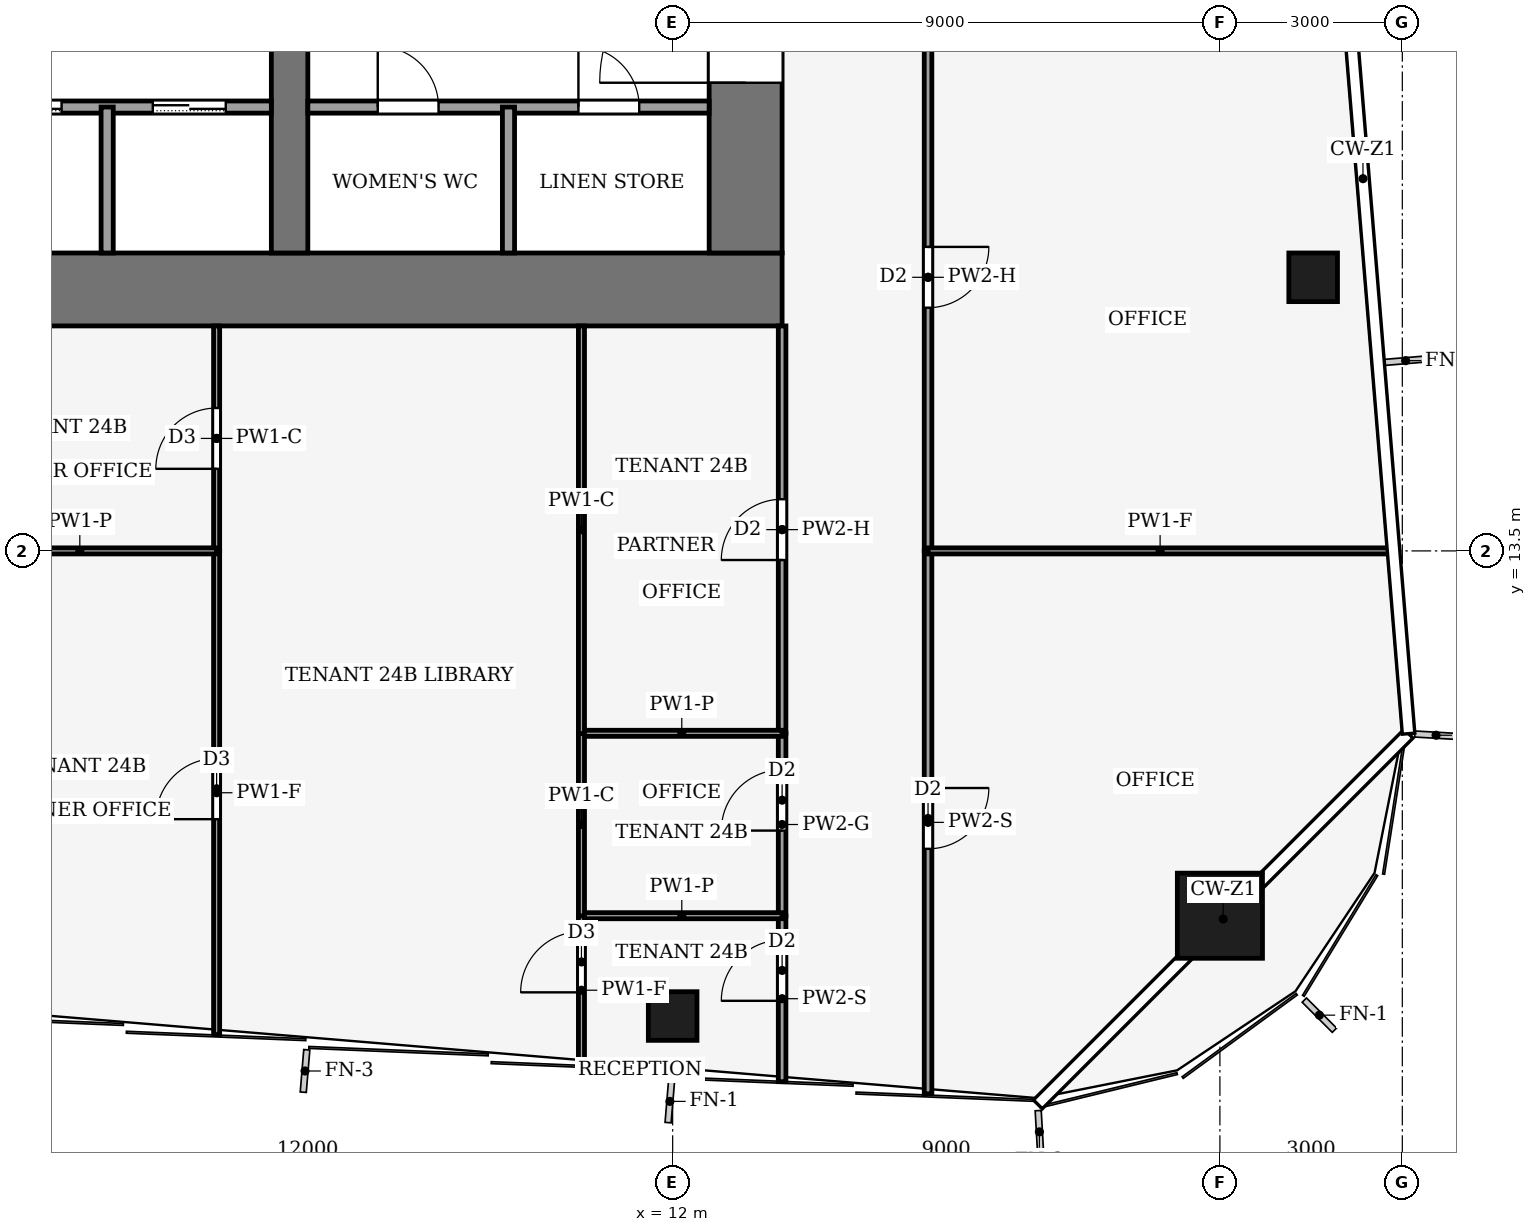
"""IFC4 building model, lengths in metres.
Left out: names, types, materials, properties, quantities, classifications, styles, units other than length and angle.
Written with IfcOpenShell. Run it as: python <this file> out.ifc"""

import sys

from ifc_helpers import new_model, si_unit, direction, frame, frame_2d, origin, origin_2d, place, context, subcontext, project, spatial, rectangle, hollow_rectangle, extrude, element, fill, save


model = new_model("IFC4")
c1 = context("Model", 3, precision=1e-05, world=origin(), true_north=direction((0.0, 1.0)))
c2 = subcontext(c1, "Body", "Model", "MODEL_VIEW")
j1 = project(units=[si_unit("LENGTHUNIT", "METRE"), si_unit("PLANEANGLEUNIT", "RADIAN")], contexts=[c1])
p1 = place(None, origin())
s1 = spatial("IfcSite", under=j1, at=p1, CompositionType="ELEMENT")
p2 = place(p1, origin())
s2 = spatial("IfcBuilding", under=s1, at=p2, CompositionType="ELEMENT")
p3 = place(p2, frame((0.0, 0.0, 106.0)))
s3 = spatial("IfcBuildingStorey", under=s2, at=p3, CompositionType="ELEMENT", Elevation=106.0)
p4 = place(p3, frame((-13.8, 17.8, -0.13), z_axis=(0.0, 0.0, 1.0), x_axis=(1.0, 0.0, 0.0)))
e1 = element("IfcWall", 1, at=p4, inside=s3, PredefinedType="SHEAR", context=c2, shape_type="SweptSolid", body=[
    extrude(rectangle(XDim=27.6, YDim=1.2, at=frame_2d((13.8, 0.0))), origin(), (0.0, 0.0, 1.0), 4.0),
])
p5 = place(p3, frame((13.2, 18.4, -0.13), z_axis=(0.0, 0.0, 1.0), x_axis=(0.0, 1.0, 0.0)))
e2 = element("IfcWall", 2, at=p5, inside=s3, PredefinedType="SHEAR", context=c2, shape_type="SweptSolid", body=[
    extrude(rectangle(XDim=19.2, YDim=1.2, at=frame_2d((9.6, 0.0))), origin(), (0.0, 0.0, 1.0), 4.0),
])
p6 = place(p5, frame((2.8, 0.0, 0.13)))
e3 = element("IfcOpeningElement", 3, at=p6, cuts=e2, PredefinedType="OPENING", context=c2, shape_type="SweptSolid", body=[
    extrude(rectangle(XDim=2.4, YDim=2.4, at=frame_2d((1.2, 1.2))), frame((0.0, 0.61, 0.0), z_axis=(0.0, -1.0, 0.0), x_axis=(1.0, 0.0, 0.0)), (0.0, 0.0, 1.0), 1.22),
])
p7 = place(p5, frame((13.3, 0.0, 0.13)))
e4 = element("IfcOpeningElement", 4, at=p7, cuts=e2, PredefinedType="OPENING", context=c2, shape_type="SweptSolid", body=[
    extrude(rectangle(XDim=2.4, YDim=2.4, at=frame_2d((1.2, 1.2))), frame((0.0, 0.61, 0.0), z_axis=(0.0, -1.0, 0.0), x_axis=(1.0, 0.0, 0.0)), (0.0, 0.0, 1.0), 1.22),
])
p8 = place(p3, frame((5.7, 18.4, -0.13), z_axis=(0.0, 0.0, 1.0), x_axis=(0.0, 1.0, 0.0)))
e5 = element("IfcWall", 5, at=p8, inside=s3, PredefinedType="SHEAR", context=c2, shape_type="SweptSolid", body=[
    extrude(rectangle(XDim=19.2, YDim=0.6, at=frame_2d((9.6, 0.0))), origin(), (0.0, 0.0, 1.0), 4.0),
])
p9 = place(p8, frame((8.35, 0.0, 0.13)))
e6 = element("IfcOpeningElement", 6, at=p9, cuts=e5, PredefinedType="OPENING", context=c2, shape_type="SweptSolid", body=[
    extrude(rectangle(XDim=0.9, YDim=2.1, at=frame_2d((0.45, 1.05))), frame((0.0, 0.31, 0.0), z_axis=(0.0, -1.0, 0.0), x_axis=(1.0, 0.0, 0.0)), (0.0, 0.0, 1.0), 0.62),
])
p10 = place(p8, frame((13.3, 0.0, 0.13)))
e7 = element("IfcOpeningElement", 7, at=p10, cuts=e5, PredefinedType="OPENING", context=c2, shape_type="SweptSolid", body=[
    extrude(rectangle(XDim=2.4, YDim=2.4, at=frame_2d((1.2, 1.2))), frame((0.0, 0.31, 0.0), z_axis=(0.0, -1.0, 0.0), x_axis=(1.0, 0.0, 0.0)), (0.0, 0.0, 1.0), 0.62),
])
p11 = place(p3, frame((21.0, 7.5, 0.0), z_axis=(0.0, 0.0, 1.0), x_axis=(1.0, 0.0, 0.0)))
e8 = element("IfcColumn", 8, at=p11, inside=s3, PredefinedType="COLUMN", context=c2, shape_type="SweptSolid", body=[
    extrude(hollow_rectangle(XDim=1.4, YDim=1.4, WallThickness=0.08, at=origin_2d()), origin(), (0.0, 0.0, 1.0), 4.0),
])
for number, where, z_axis, x_axis in (
    (9, (12.0, 5.85, 0.0), (0.0, 0.0, 1.0), (1.0, 0.0, 0.0)),
    (10, (22.534, 18.0, 0.0), (0.0, 0.0, 1.0), (1.0, 0.0, 0.0)),
):
    element("IfcColumn", number, at=place(p3, frame(where, z_axis=z_axis, x_axis=x_axis)), inside=s3, PredefinedType="COLUMN", context=c2, shape_type="SweptSolid", body=[
        extrude(hollow_rectangle(XDim=0.8, YDim=0.8, WallThickness=0.04, at=origin_2d()), origin(), (0.0, 0.0, 1.0), 4.0),
    ])
p12 = place(p3, frame((-5.4, 20.8, 0.0), z_axis=(0.0, 0.0, 1.0), x_axis=(1.0, 0.0, 0.0)))
e11 = element("IfcWall", 11, at=p12, inside=s3, PredefinedType="PARTITIONING", context=c2, shape_type="SweptSolid", body=[
    extrude(rectangle(XDim=10.8, YDim=0.2, at=frame_2d((5.4, 0.0))), origin(), (0.0, 0.0, 1.0), 3.87),
])
p13 = place(p12, frame((0.75, 0.0, 0.0)))
e12 = element("IfcOpeningElement", 12, at=p13, cuts=e11, PredefinedType="OPENING", context=c2, shape_type="SweptSolid", body=[
    extrude(rectangle(XDim=1.2, YDim=2.2, at=frame_2d((0.6, 1.1))), frame((0.0, 0.11, 0.0), z_axis=(0.0, -1.0, 0.0), x_axis=(1.0, 0.0, 0.0)), (0.0, 0.0, 1.0), 0.22),
])
p14 = place(p12, frame((3.45, 0.0, 0.0)))
e13 = element("IfcOpeningElement", 13, at=p14, cuts=e11, PredefinedType="OPENING", context=c2, shape_type="SweptSolid", body=[
    extrude(rectangle(XDim=1.2, YDim=2.2, at=frame_2d((0.6, 1.1))), frame((0.0, 0.11, 0.0), z_axis=(0.0, -1.0, 0.0), x_axis=(1.0, 0.0, 0.0)), (0.0, 0.0, 1.0), 0.22),
])
p15 = place(p12, frame((6.15, 0.0, 0.0)))
e14 = element("IfcOpeningElement", 14, at=p15, cuts=e11, PredefinedType="OPENING", context=c2, shape_type="SweptSolid", body=[
    extrude(rectangle(XDim=1.2, YDim=2.2, at=frame_2d((0.6, 1.1))), frame((0.0, 0.11, 0.0), z_axis=(0.0, -1.0, 0.0), x_axis=(1.0, 0.0, 0.0)), (0.0, 0.0, 1.0), 0.22),
])
p16 = place(p12, frame((8.85, 0.0, 0.0)))
e15 = element("IfcOpeningElement", 15, at=p16, cuts=e11, PredefinedType="OPENING", context=c2, shape_type="SweptSolid", body=[
    extrude(rectangle(XDim=1.2, YDim=2.2, at=frame_2d((0.6, 1.1))), frame((0.0, 0.11, 0.0), z_axis=(0.0, -1.0, 0.0), x_axis=(1.0, 0.0, 0.0)), (0.0, 0.0, 1.0), 0.22),
])
p17 = place(p3, frame((6.0, 20.8, 0.0), z_axis=(0.0, 0.0, 1.0), x_axis=(1.0, 0.0, 0.0)))
e16 = element("IfcWall", 16, at=p17, inside=s3, PredefinedType="PARTITIONING", context=c2, shape_type="SweptSolid", body=[
    extrude(rectangle(XDim=6.6, YDim=0.2, at=frame_2d((3.3, 0.0))), origin(), (0.0, 0.0, 1.0), 3.87),
])
p18 = place(p17, frame((1.15, 0.0, 0.0)))
e17 = element("IfcOpeningElement", 17, at=p18, cuts=e16, PredefinedType="OPENING", context=c2, shape_type="SweptSolid", body=[
    extrude(rectangle(XDim=1.0, YDim=2.1, at=frame_2d((0.5, 1.05))), frame((0.0, 0.11, 0.0), z_axis=(0.0, -1.0, 0.0), x_axis=(1.0, 0.0, 0.0)), (0.0, 0.0, 1.0), 0.22),
])
p19 = place(p17, frame((4.45, 0.0, 0.0)))
e18 = element("IfcOpeningElement", 18, at=p19, cuts=e16, PredefinedType="OPENING", context=c2, shape_type="SweptSolid", body=[
    extrude(rectangle(XDim=1.0, YDim=2.1, at=frame_2d((0.5, 1.05))), frame((0.0, 0.11, 0.0), z_axis=(0.0, -1.0, 0.0), x_axis=(1.0, 0.0, 0.0)), (0.0, 0.0, 1.0), 0.22),
])
for number, where, z_axis, x_axis in (
    (19, (2.7, 18.4, 0.0), (0.0, 0.0, 1.0), (0.0, 1.0, 0.0)),
    (20, (9.3, 18.4, 0.0), (0.0, 0.0, 1.0), (0.0, 1.0, 0.0)),
):
    element("IfcWall", number, at=place(p3, frame(where, z_axis=z_axis, x_axis=x_axis)), inside=s3, PredefinedType="PARTITIONING", context=c2, shape_type="SweptSolid", body=[
        extrude(rectangle(XDim=2.4, YDim=0.2, at=frame_2d((1.2, 0.0))), origin(), (0.0, 0.0, 1.0), 3.87),
    ])
p20 = place(p3, frame((16.2, 13.5, 0.0), z_axis=(0.0, 0.0, 1.0), x_axis=(0.0, -1.0, 0.0)))
e21 = element("IfcWall", 21, at=p20, inside=s3, PredefinedType="PARTITIONING", context=c2, shape_type="SweptSolid", body=[
    extrude(rectangle(XDim=8.93, YDim=0.125, at=frame_2d((4.465, 0.0))), origin(), (0.0, 0.0, 1.0), 3.04),
])
p21 = place(p20, frame((3.9, 0.0, 0.0)))
e22 = element("IfcOpeningElement", 22, at=p21, cuts=e21, PredefinedType="OPENING", context=c2, shape_type="SweptSolid", body=[
    extrude(rectangle(XDim=1.0, YDim=2.1, at=frame_2d((0.5, 1.05))), frame((0.0, 0.073, 0.0), z_axis=(0.0, -1.0, 0.0), x_axis=(1.0, 0.0, 0.0)), (0.0, 0.0, 1.0), 0.145),
])
p22 = place(p3, frame((16.2, 22.5, 0.0), z_axis=(0.0, 0.0, 1.0), x_axis=(0.0, -1.0, 0.0)))
e23 = element("IfcWall", 23, at=p22, inside=s3, PredefinedType="PARTITIONING", context=c2, shape_type="SweptSolid", body=[
    extrude(rectangle(XDim=9.0, YDim=0.125, at=frame_2d((4.5, 0.0))), origin(), (0.0, 0.0, 1.0), 3.14),
])
p23 = place(p22, frame((4.0, 0.0, 0.0)))
e24 = element("IfcOpeningElement", 24, at=p23, cuts=e23, PredefinedType="OPENING", context=c2, shape_type="SweptSolid", body=[
    extrude(rectangle(XDim=1.0, YDim=2.1, at=frame_2d((0.5, 1.05))), frame((0.0, 0.073, 0.0), z_axis=(0.0, -1.0, 0.0), x_axis=(1.0, 0.0, 0.0)), (0.0, 0.0, 1.0), 0.145),
])
p24 = place(p3, frame((13.8, 4.77, 0.0), z_axis=(0.0, 0.0, 1.0), x_axis=(0.0, 1.0, 0.0)))
e25 = element("IfcWall", 25, at=p24, inside=s3, PredefinedType="PARTITIONING", context=c2, shape_type="SweptSolid", body=[
    extrude(rectangle(XDim=2.73, YDim=0.125, at=frame_2d((1.365, 0.0))), origin(), (0.0, 0.0, 1.0), 3.04),
])
p25 = place(p24, frame((1.33, 0.0, 0.0)))
e26 = element("IfcOpeningElement", 26, at=p25, cuts=e25, PredefinedType="OPENING", context=c2, shape_type="SweptSolid", body=[
    extrude(rectangle(XDim=1.0, YDim=2.1, at=frame_2d((0.5, 1.05))), frame((0.0, 0.073, 0.0), z_axis=(0.0, -1.0, 0.0), x_axis=(1.0, 0.0, 0.0)), (0.0, 0.0, 1.0), 0.145),
])
p26 = place(p3, frame((13.8, 7.5, 0.0), z_axis=(0.0, 0.0, 1.0), x_axis=(0.0, 1.0, 0.0)))
e27 = element("IfcWall", 27, at=p26, inside=s3, PredefinedType="PARTITIONING", context=c2, shape_type="SweptSolid", body=[
    extrude(rectangle(XDim=3.0, YDim=0.125, at=frame_2d((1.5, 0.0))), origin(), (0.0, 0.0, 1.0), 3.87),
])
p27 = place(p26, frame((1.4, 0.0, 0.0)))
e28 = element("IfcOpeningElement", 28, at=p27, cuts=e27, PredefinedType="OPENING", context=c2, shape_type="SweptSolid", body=[
    extrude(rectangle(XDim=1.0, YDim=2.1, at=frame_2d((0.5, 1.05))), frame((0.0, 0.073, 0.0), z_axis=(0.0, -1.0, 0.0), x_axis=(1.0, 0.0, 0.0)), (0.0, 0.0, 1.0), 0.145),
])
p28 = place(p3, frame((13.8, 10.5, 0.0), z_axis=(0.0, 0.0, 1.0), x_axis=(0.0, 1.0, 0.0)))
e29 = element("IfcWall", 29, at=p28, inside=s3, PredefinedType="PARTITIONING", context=c2, shape_type="SweptSolid", body=[
    extrude(rectangle(XDim=6.7, YDim=0.125, at=frame_2d((3.35, 0.0))), origin(), (0.0, 0.0, 1.0), 3.14),
])
p29 = place(p28, frame((2.85, 0.0, 0.0)))
e30 = element("IfcOpeningElement", 30, at=p29, cuts=e29, PredefinedType="OPENING", context=c2, shape_type="SweptSolid", body=[
    extrude(rectangle(XDim=1.0, YDim=2.1, at=frame_2d((0.5, 1.05))), frame((0.0, 0.073, 0.0), z_axis=(0.0, -1.0, 0.0), x_axis=(1.0, 0.0, 0.0)), (0.0, 0.0, 1.0), 0.145),
])
p30 = place(p3, frame((23.833, 13.5, 0.0), z_axis=(0.0, 0.0, 1.0), x_axis=(-1.0, 0.0, 0.0)))
e31 = element("IfcWall", 31, at=p30, inside=s3, PredefinedType="PARTITIONING", context=c2, shape_type="SweptSolid", body=[
    extrude(rectangle(XDim=7.634, YDim=0.1, at=frame_2d((3.817, 0.0))), origin(), (0.0, 0.0, 1.0), 3.04),
])
p31 = place(p3, frame((13.8, 7.5, 0.0), z_axis=(0.0, 0.0, 1.0), x_axis=(-1.0, 0.0, 0.0)))
e32 = element("IfcWall", 32, at=p31, inside=s3, PredefinedType="PARTITIONING", context=c2, shape_type="SweptSolid", body=[
    extrude(rectangle(XDim=3.3, YDim=0.1, at=frame_2d((1.65, 0.0))), origin(), (0.0, 0.0, 1.0), 3.44),
])
p32 = place(p3, frame((10.5, 5.045, 0.0), z_axis=(0.0, 0.0, 1.0), x_axis=(0.0, 1.0, 0.0)))
e33 = element("IfcWall", 33, at=p32, inside=s3, PredefinedType="PARTITIONING", context=c2, shape_type="SweptSolid", body=[
    extrude(rectangle(XDim=2.459, YDim=0.1, at=frame_2d((1.229, 0.0))), origin(), (0.0, 0.0, 1.0), 3.04),
])
p33 = place(p32, frame((1.195, 0.0, 0.0)))
e34 = element("IfcOpeningElement", 34, at=p33, cuts=e33, PredefinedType="OPENING", context=c2, shape_type="SweptSolid", body=[
    extrude(rectangle(XDim=1.0, YDim=2.1, at=frame_2d((0.5, 1.05))), frame((0.0, 0.06, 0.0), z_axis=(0.0, -1.0, 0.0), x_axis=(1.0, 0.0, 0.0)), (0.0, 0.0, 1.0), 0.12),
])
p34 = place(p3, frame((13.8, 10.5, 0.0), z_axis=(0.0, 0.0, 1.0), x_axis=(-1.0, 0.0, 0.0)))
e35 = element("IfcWall", 35, at=p34, inside=s3, PredefinedType="PARTITIONING", context=c2, shape_type="SweptSolid", body=[
    extrude(rectangle(XDim=3.3, YDim=0.1, at=frame_2d((1.65, 0.0))), origin(), (0.0, 0.0, 1.0), 3.44),
])
p35 = place(p3, frame((10.5, 10.504, 0.0), z_axis=(0.0, 0.0, 1.0), x_axis=(0.0, -1.0, 0.0)))
e36 = element("IfcWall", 36, at=p35, inside=s3, PredefinedType="PARTITIONING", context=c2, shape_type="SweptSolid", body=[
    extrude(rectangle(XDim=3.008, YDim=0.1, at=frame_2d((1.504, 0.0))), origin(), (0.0, 0.0, 1.0), 3.87),
])
p36 = place(p3, frame((10.5, 17.2, 0.0), z_axis=(0.0, 0.0, 1.0), x_axis=(0.0, -1.0, 0.0)))
e37 = element("IfcWall", 37, at=p36, inside=s3, PredefinedType="PARTITIONING", context=c2, shape_type="SweptSolid", body=[
    extrude(rectangle(XDim=6.704, YDim=0.1, at=frame_2d((3.352, 0.0))), origin(), (0.0, 0.0, 1.0), 3.87),
])
p37 = place(p3, frame((4.5, 5.545, 0.0), z_axis=(0.0, 0.0, 1.0), x_axis=(0.0, 1.0, 0.0)))
e38 = element("IfcWall", 38, at=p37, inside=s3, PredefinedType="PARTITIONING", context=c2, shape_type="SweptSolid", body=[
    extrude(rectangle(XDim=7.955, YDim=0.1, at=frame_2d((3.978, 0.0))), origin(), (0.0, 0.0, 1.0), 3.04),
])
p38 = place(p37, frame((3.542, 0.0, 0.0)))
e39 = element("IfcOpeningElement", 39, at=p38, cuts=e38, PredefinedType="OPENING", context=c2, shape_type="SweptSolid", body=[
    extrude(rectangle(XDim=1.0, YDim=2.1, at=frame_2d((0.5, 1.05))), frame((0.0, 0.06, 0.0), z_axis=(0.0, -1.0, 0.0), x_axis=(1.0, 0.0, 0.0)), (0.0, 0.0, 1.0), 0.12),
])
p39 = place(p3, frame((4.5, 13.5, 0.0), z_axis=(0.0, 0.0, 1.0), x_axis=(0.0, 1.0, 0.0)))
e40 = element("IfcWall", 40, at=p39, inside=s3, PredefinedType="PARTITIONING", context=c2, shape_type="SweptSolid", body=[
    extrude(rectangle(XDim=3.7, YDim=0.1, at=frame_2d((1.85, 0.0))), origin(), (0.0, 0.0, 1.0), 3.87),
])
p40 = place(p39, frame((1.35, 0.0, 0.0)))
e41 = element("IfcOpeningElement", 41, at=p40, cuts=e40, PredefinedType="OPENING", context=c2, shape_type="SweptSolid", body=[
    extrude(rectangle(XDim=1.0, YDim=2.1, at=frame_2d((0.5, 1.05))), frame((0.0, 0.06, 0.0), z_axis=(0.0, -1.0, 0.0), x_axis=(1.0, 0.0, 0.0)), (0.0, 0.0, 1.0), 0.12),
])
p41 = place(p3, frame((4.5, 13.5, 0.0), z_axis=(0.0, 0.0, 1.0), x_axis=(-1.0, 0.0, 0.0)))
e42 = element("IfcWall", 42, at=p41, inside=s3, PredefinedType="PARTITIONING", context=c2, shape_type="SweptSolid", body=[
    extrude(rectangle(XDim=4.5, YDim=0.1, at=frame_2d((2.25, 0.0))), origin(), (0.0, 0.0, 1.0), 3.44),
])
p42 = place(p15, origin())
e43 = element("IfcDoor", 43, at=p42, inside=s3, OperationType="SLIDING_TO_LEFT", PredefinedType="DOOR", context=c2, shape_type="SweptSolid", body=[
    extrude(rectangle(XDim=1.2, YDim=2.2, at=frame_2d((0.6, 1.1))), frame((0.0, 0.025, 0.0), z_axis=(0.0, -1.0, 0.0), x_axis=(1.0, 0.0, 0.0)), (0.0, 0.0, 1.0), 0.05),
])
fill(e14, e43)
p43 = place(p16, origin())
e44 = element("IfcDoor", 44, at=p43, inside=s3, OperationType="SLIDING_TO_LEFT", PredefinedType="DOOR", context=c2, shape_type="SweptSolid", body=[
    extrude(rectangle(XDim=1.2, YDim=2.2, at=frame_2d((0.6, 1.1))), frame((0.0, 0.025, 0.0), z_axis=(0.0, -1.0, 0.0), x_axis=(1.0, 0.0, 0.0)), (0.0, 0.0, 1.0), 0.05),
])
fill(e15, e44)
p44 = place(p18, origin())
e45 = element("IfcDoor", 45, at=p44, inside=s3, OperationType="SINGLE_SWING_LEFT", PredefinedType="DOOR", context=c2, shape_type="SweptSolid", body=[
    extrude(rectangle(XDim=1.0, YDim=2.1, at=frame_2d((0.5, 1.05))), frame((0.0, 0.025, 0.0), z_axis=(0.0, -1.0, 0.0), x_axis=(1.0, 0.0, 0.0)), (0.0, 0.0, 1.0), 0.05),
])
fill(e17, e45)
p45 = place(p19, origin())
e46 = element("IfcDoor", 46, at=p45, inside=s3, OperationType="SINGLE_SWING_LEFT", PredefinedType="DOOR", context=c2, shape_type="SweptSolid", body=[
    extrude(rectangle(XDim=1.0, YDim=2.1, at=frame_2d((0.5, 1.05))), frame((0.0, 0.025, 0.0), z_axis=(0.0, -1.0, 0.0), x_axis=(1.0, 0.0, 0.0)), (0.0, 0.0, 1.0), 0.05),
])
fill(e18, e46)
p46 = place(p6, origin())
e47 = element("IfcDoor", 47, at=p46, inside=s3, OperationType="DOUBLE_DOOR_SINGLE_SWING", PredefinedType="DOOR", context=c2, shape_type="SweptSolid", body=[
    extrude(rectangle(XDim=2.4, YDim=2.4, at=frame_2d((1.2, 1.2))), frame((0.0, 0.025, 0.0), z_axis=(0.0, -1.0, 0.0), x_axis=(1.0, 0.0, 0.0)), (0.0, 0.0, 1.0), 0.05),
])
fill(e3, e47)
p47 = place(p21, origin())
e48 = element("IfcDoor", 48, at=p47, inside=s3, OperationType="SINGLE_SWING_LEFT", PredefinedType="DOOR", context=c2, shape_type="SweptSolid", body=[
    extrude(rectangle(XDim=1.0, YDim=2.1, at=frame_2d((0.5, 1.05))), frame((0.0, 0.025, 0.0), z_axis=(0.0, -1.0, 0.0), x_axis=(1.0, 0.0, 0.0)), (0.0, 0.0, 1.0), 0.05),
])
fill(e22, e48)
p48 = place(p23, origin())
e49 = element("IfcDoor", 49, at=p48, inside=s3, OperationType="SINGLE_SWING_LEFT", PredefinedType="DOOR", context=c2, shape_type="SweptSolid", body=[
    extrude(rectangle(XDim=1.0, YDim=2.1, at=frame_2d((0.5, 1.05))), frame((0.0, 0.025, 0.0), z_axis=(0.0, -1.0, 0.0), x_axis=(1.0, 0.0, 0.0)), (0.0, 0.0, 1.0), 0.05),
])
fill(e24, e49)
p49 = place(p25, origin())
e50 = element("IfcDoor", 50, at=p49, inside=s3, OperationType="SINGLE_SWING_RIGHT", PredefinedType="DOOR", context=c2, shape_type="SweptSolid", body=[
    extrude(rectangle(XDim=1.0, YDim=2.1, at=frame_2d((0.5, 1.05))), frame((0.0, 0.025, 0.0), z_axis=(0.0, -1.0, 0.0), x_axis=(1.0, 0.0, 0.0)), (0.0, 0.0, 1.0), 0.05),
])
fill(e26, e50)
p50 = place(p27, origin())
e51 = element("IfcDoor", 51, at=p50, inside=s3, OperationType="SINGLE_SWING_RIGHT", PredefinedType="DOOR", context=c2, shape_type="SweptSolid", body=[
    extrude(rectangle(XDim=1.0, YDim=2.1, at=frame_2d((0.5, 1.05))), frame((0.0, 0.025, 0.0), z_axis=(0.0, -1.0, 0.0), x_axis=(1.0, 0.0, 0.0)), (0.0, 0.0, 1.0), 0.05),
])
fill(e28, e51)
p51 = place(p29, origin())
e52 = element("IfcDoor", 52, at=p51, inside=s3, OperationType="SINGLE_SWING_RIGHT", PredefinedType="DOOR", context=c2, shape_type="SweptSolid", body=[
    extrude(rectangle(XDim=1.0, YDim=2.1, at=frame_2d((0.5, 1.05))), frame((0.0, 0.025, 0.0), z_axis=(0.0, -1.0, 0.0), x_axis=(1.0, 0.0, 0.0)), (0.0, 0.0, 1.0), 0.05),
])
fill(e30, e52)
p52 = place(p33, origin())
e53 = element("IfcDoor", 53, at=p52, inside=s3, OperationType="SINGLE_SWING_RIGHT", PredefinedType="DOOR", context=c2, shape_type="SweptSolid", body=[
    extrude(rectangle(XDim=1.0, YDim=2.1, at=frame_2d((0.5, 1.05))), frame((0.0, 0.025, 0.0), z_axis=(0.0, -1.0, 0.0), x_axis=(1.0, 0.0, 0.0)), (0.0, 0.0, 1.0), 0.05),
])
fill(e34, e53)
p53 = place(p38, origin())
e54 = element("IfcDoor", 54, at=p53, inside=s3, OperationType="SINGLE_SWING_RIGHT", PredefinedType="DOOR", context=c2, shape_type="SweptSolid", body=[
    extrude(rectangle(XDim=1.0, YDim=2.1, at=frame_2d((0.5, 1.05))), frame((0.0, 0.025, 0.0), z_axis=(0.0, -1.0, 0.0), x_axis=(1.0, 0.0, 0.0)), (0.0, 0.0, 1.0), 0.05),
])
fill(e39, e54)
p54 = place(p40, origin())
e55 = element("IfcDoor", 55, at=p54, inside=s3, OperationType="SINGLE_SWING_LEFT", PredefinedType="DOOR", context=c2, shape_type="SweptSolid", body=[
    extrude(rectangle(XDim=1.0, YDim=2.1, at=frame_2d((0.5, 1.05))), frame((0.0, 0.025, 0.0), z_axis=(0.0, -1.0, 0.0), x_axis=(1.0, 0.0, 0.0)), (0.0, 0.0, 1.0), 0.05),
])
fill(e41, e55)
save(model, sys.argv[1])
